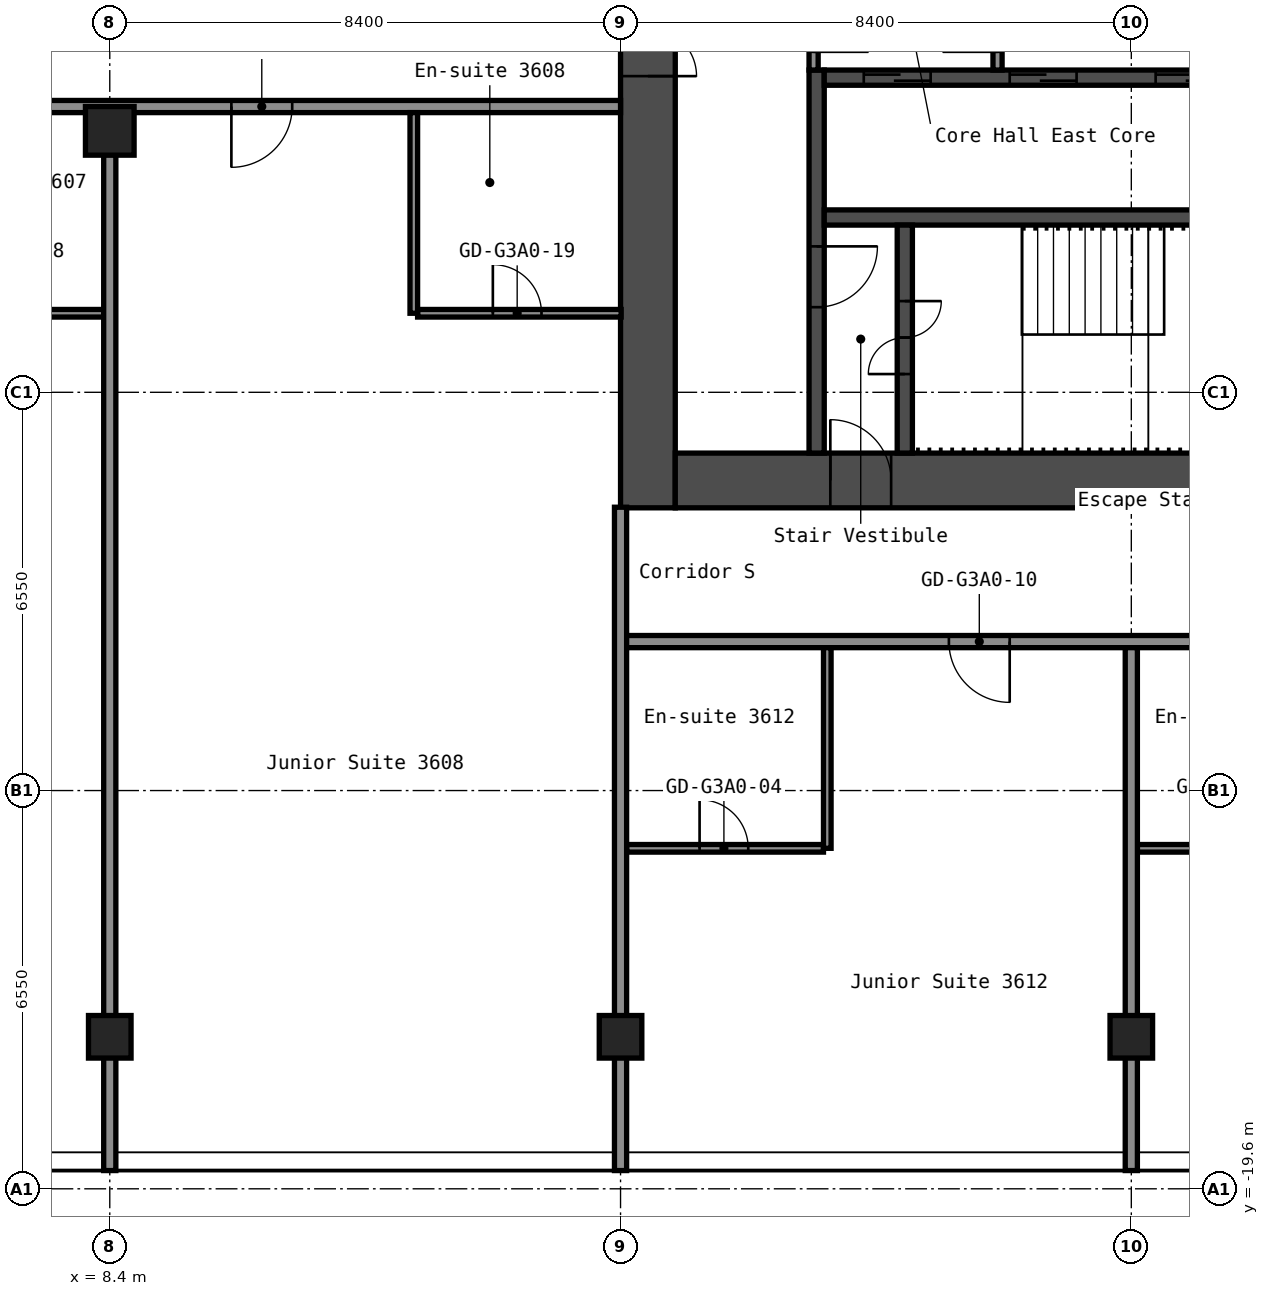
"""IFC4 building model, lengths in metres.
Left out: names, types, materials, properties, quantities, classifications, styles, units other than length and angle.
Written with IfcOpenShell. Run it as: python <this file> out.ifc"""

import sys

from ifc_helpers import new_model, si_unit, direction, frame, frame_2d, origin, origin_2d, place, context, subcontext, project, spatial, rectangle, hollow_rectangle, extrude, element, fill, save


model = new_model("IFC4")
c1 = context("Model", 3, precision=1e-05, world=origin(), true_north=direction((0.0, 1.0)))
c2 = subcontext(c1, "Body", "Model", "MODEL_VIEW")
j1 = project(units=[si_unit("LENGTHUNIT", "METRE"), si_unit("PLANEANGLEUNIT", "RADIAN")], contexts=[c1])
p1 = place(None, origin())
s1 = spatial("IfcSite", under=j1, at=p1, CompositionType="ELEMENT")
p2 = place(p1, origin())
s2 = spatial("IfcBuilding", under=s1, at=p2, CompositionType="ELEMENT")
p3 = place(p2, frame((0.0, 0.0, 131.0)))
s3 = spatial("IfcBuildingStorey", under=s2, at=p3, CompositionType="ELEMENT", Elevation=131.0)
p4 = place(p3, frame((8.4, -17.1, 0.0), z_axis=(0.0, 0.0, 1.0), x_axis=(1.0, 0.0, 0.0)))
e1 = element("IfcColumn", 1, at=p4, inside=s3, PredefinedType="COLUMN", context=c2, shape_type="SweptSolid", body=[
    extrude(hollow_rectangle(XDim=0.7, YDim=0.7, WallThickness=0.028, at=origin_2d()), origin(), (0.0, 0.0, 1.0), 2.75),
])
p5 = place(p3, frame((8.4, -2.2, 0.0), z_axis=(0.0, 0.0, 1.0), x_axis=(1.0, 0.0, 0.0)))
e2 = element("IfcColumn", 2, at=p5, inside=s3, PredefinedType="COLUMN", context=c2, shape_type="SweptSolid", body=[
    extrude(hollow_rectangle(XDim=0.8, YDim=0.8, WallThickness=0.032, at=origin_2d()), origin(), (0.0, 0.0, 1.0), 2.75),
])
for number, where, z_axis, x_axis in (
    (3, (16.8, -17.1, 0.0), (0.0, 0.0, 1.0), (1.0, 0.0, 0.0)),
    (4, (25.2, -17.1, 0.0), (0.0, 0.0, 1.0), (1.0, 0.0, 0.0)),
):
    element("IfcColumn", number, at=place(p3, frame(where, z_axis=z_axis, x_axis=x_axis)), inside=s3, PredefinedType="COLUMN", context=c2, shape_type="SweptSolid", body=[
        extrude(hollow_rectangle(XDim=0.7, YDim=0.7, WallThickness=0.028, at=origin_2d()), origin(), (0.0, 0.0, 1.0), 2.75),
    ])
p6 = place(p3, frame((17.25, -8.4, 0.0), z_axis=(0.0, 0.0, 1.0), x_axis=(0.0, 1.0, 0.0)))
e5 = element("IfcWall", 5, at=p6, inside=s3, PredefinedType="SHEAR", context=c2, shape_type="SweptSolid", body=[
    extrude(rectangle(XDim=16.8, YDim=0.9, at=frame_2d((8.4, 0.0))), origin(), (0.0, 0.0, 1.0), 2.75),
])
p7 = place(p6, frame((7.1, 0.0, 0.0)))
e6 = element("IfcOpeningElement", 6, at=p7, cuts=e5, PredefinedType="OPENING", context=c2, shape_type="SweptSolid", body=[
    extrude(rectangle(XDim=1.6, YDim=2.1, at=frame_2d((0.8, 1.05))), frame((0.0, 0.46, 0.0), z_axis=(0.0, -1.0, 0.0), x_axis=(1.0, 0.0, 0.0)), (0.0, 0.0, 1.0), 0.92),
])
p8 = place(p3, frame((17.7, -7.95, 0.0), z_axis=(0.0, 0.0, 1.0), x_axis=(1.0, 0.0, 0.0)))
e7 = element("IfcWall", 7, at=p8, inside=s3, PredefinedType="SHEAR", context=c2, shape_type="SweptSolid", body=[
    extrude(rectangle(XDim=15.0, YDim=0.9, at=frame_2d((7.5, 0.0))), origin(), (0.0, 0.0, 1.0), 2.75),
])
p9 = place(p8, frame((2.55, 0.0, 0.0)))
e8 = element("IfcOpeningElement", 8, at=p9, cuts=e7, PredefinedType="OPENING", context=c2, shape_type="SweptSolid", body=[
    extrude(rectangle(XDim=1.0, YDim=2.1, at=frame_2d((0.5, 1.05))), frame((0.0, 0.46, 0.0), z_axis=(0.0, -1.0, 0.0), x_axis=(1.0, 0.0, 0.0)), (0.0, 0.0, 1.0), 0.92),
])
p10 = place(p3, frame((20.025, -7.5, 0.0), z_axis=(0.0, 0.0, 1.0), x_axis=(0.0, 1.0, 0.0)))
e9 = element("IfcWall", 9, at=p10, inside=s3, PredefinedType="SHEAR", context=c2, shape_type="SweptSolid", body=[
    extrude(rectangle(XDim=6.3, YDim=0.25, at=frame_2d((3.15, 0.0))), origin(), (0.0, 0.0, 1.0), 2.75),
])
p11 = place(p10, frame((2.4, 0.0, 0.0)))
e10 = element("IfcOpeningElement", 10, at=p11, cuts=e9, PredefinedType="OPENING", context=c2, shape_type="SweptSolid", body=[
    extrude(rectangle(XDim=1.0, YDim=2.1, at=frame_2d((0.5, 1.05))), frame((0.0, 0.135, 0.0), z_axis=(0.0, -1.0, 0.0), x_axis=(1.0, 0.0, 0.0)), (0.0, 0.0, 1.0), 0.27),
])
p12 = place(p3, frame((20.15, -1.325, 0.0), z_axis=(0.0, 0.0, 1.0), x_axis=(1.0, 0.0, 0.0)))
e11 = element("IfcWall", 11, at=p12, inside=s3, PredefinedType="SHEAR", context=c2, shape_type="SweptSolid", body=[
    extrude(rectangle(XDim=7.5, YDim=0.25, at=frame_2d((3.75, 0.0))), origin(), (0.0, 0.0, 1.0), 2.75),
])
p13 = place(p12, frame((0.65, 0.0, 0.0)))
e12 = element("IfcOpeningElement", 12, at=p13, cuts=e11, PredefinedType="OPENING", context=c2, shape_type="SweptSolid", body=[
    extrude(rectangle(XDim=1.1, YDim=2.1, at=frame_2d((0.55, 1.05))), frame((0.0, 0.135, 0.0), z_axis=(0.0, -1.0, 0.0), x_axis=(1.0, 0.0, 0.0)), (0.0, 0.0, 1.0), 0.27),
])
p14 = place(p12, frame((3.05, 0.0, 0.0)))
e13 = element("IfcOpeningElement", 13, at=p14, cuts=e11, PredefinedType="OPENING", context=c2, shape_type="SweptSolid", body=[
    extrude(rectangle(XDim=1.1, YDim=2.1, at=frame_2d((0.55, 1.05))), frame((0.0, 0.135, 0.0), z_axis=(0.0, -1.0, 0.0), x_axis=(1.0, 0.0, 0.0)), (0.0, 0.0, 1.0), 0.27),
])
p15 = place(p12, frame((5.45, 0.0, 0.0)))
e14 = element("IfcOpeningElement", 14, at=p15, cuts=e11, PredefinedType="OPENING", context=c2, shape_type="SweptSolid", body=[
    extrude(rectangle(XDim=1.1, YDim=2.1, at=frame_2d((0.55, 1.05))), frame((0.0, 0.135, 0.0), z_axis=(0.0, -1.0, 0.0), x_axis=(1.0, 0.0, 0.0)), (0.0, 0.0, 1.0), 0.27),
])
p16 = place(p3, frame((20.15, -3.625, 0.0), z_axis=(0.0, 0.0, 1.0), x_axis=(1.0, 0.0, 0.0)))
e15 = element("IfcWall", 15, at=p16, inside=s3, PredefinedType="SHEAR", context=c2, shape_type="SweptSolid", body=[
    extrude(rectangle(XDim=7.5, YDim=0.25, at=frame_2d((3.75, 0.0))), origin(), (0.0, 0.0, 1.0), 2.75),
])
p17 = place(p3, frame((21.475, -7.5, 0.0), z_axis=(0.0, 0.0, 1.0), x_axis=(0.0, 1.0, 0.0)))
e16 = element("IfcWall", 16, at=p17, inside=s3, PredefinedType="SHEAR", context=c2, shape_type="SweptSolid", body=[
    extrude(rectangle(XDim=3.75, YDim=0.25, at=frame_2d((1.875, 0.0))), origin(), (0.0, 0.0, 1.0), 2.75),
])
p18 = place(p17, frame((1.3, 0.0, 0.0)))
e17 = element("IfcOpeningElement", 17, at=p18, cuts=e16, PredefinedType="OPENING", context=c2, shape_type="SweptSolid", body=[
    extrude(rectangle(XDim=1.2, YDim=2.1, at=frame_2d((0.6, 1.05))), frame((0.0, 0.135, 0.0), z_axis=(0.0, -1.0, 0.0), x_axis=(1.0, 0.0, 0.0)), (0.0, 0.0, 1.0), 0.27),
])
p19 = place(p3, frame((19.975, -1.2, 0.0), z_axis=(0.0, 0.0, 1.0), x_axis=(0.0, 1.0, 0.0)))
e18 = element("IfcWall", 18, at=p19, inside=s3, PredefinedType="PARTITIONING", context=c2, shape_type="SweptSolid", body=[
    extrude(rectangle(XDim=2.4, YDim=0.15, at=frame_2d((1.2, 0.0))), origin(), (0.0, 0.0, 1.0), 2.75),
])
p20 = place(p19, frame((0.3, 0.0, 0.0)))
e19 = element("IfcOpeningElement", 19, at=p20, cuts=e18, PredefinedType="OPENING", context=c2, shape_type="SweptSolid", body=[
    extrude(rectangle(XDim=1.8, YDim=2.1, at=frame_2d((0.9, 1.05))), frame((0.0, 0.085, 0.0), z_axis=(0.0, -1.0, 0.0), x_axis=(1.0, 0.0, 0.0)), (0.0, 0.0, 1.0), 0.17),
])
p21 = place(p3, frame((23.0, -1.2, 0.0), z_axis=(0.0, 0.0, 1.0), x_axis=(0.0, 1.0, 0.0)))
e20 = element("IfcWall", 20, at=p21, inside=s3, PredefinedType="PARTITIONING", context=c2, shape_type="SweptSolid", body=[
    extrude(rectangle(XDim=2.4, YDim=0.15, at=frame_2d((1.2, 0.0))), origin(), (0.0, 0.0, 1.0), 2.75),
])
p22 = place(p21, frame((0.3, 0.0, 0.0)))
e21 = element("IfcOpeningElement", 21, at=p22, cuts=e20, PredefinedType="OPENING", context=c2, shape_type="SweptSolid", body=[
    extrude(rectangle(XDim=1.8, YDim=2.1, at=frame_2d((0.9, 1.05))), frame((0.0, 0.085, 0.0), z_axis=(0.0, -1.0, 0.0), x_axis=(1.0, 0.0, 0.0)), (0.0, 0.0, 1.0), 0.17),
])
p23 = place(p3, frame((16.9, -14.0, 0.0), z_axis=(0.0, 0.0, 1.0), x_axis=(1.0, 0.0, 0.0)))
e22 = element("IfcWall", 22, at=p23, inside=s3, PredefinedType="PARTITIONING", context=c2, shape_type="SweptSolid", body=[
    extrude(rectangle(XDim=3.238, YDim=0.125, at=frame_2d((1.619, 0.0))), origin(), (0.0, 0.0, 1.0), 2.75),
])
p24 = place(p23, frame((1.2, 0.0, 0.0)))
e23 = element("IfcOpeningElement", 23, at=p24, cuts=e22, PredefinedType="OPENING", context=c2, shape_type="SweptSolid", body=[
    extrude(rectangle(XDim=0.8, YDim=2.1, at=frame_2d((0.4, 1.05))), frame((0.0, 0.073, 0.0), z_axis=(0.0, -1.0, 0.0), x_axis=(1.0, 0.0, 0.0)), (0.0, 0.0, 1.0), 0.145),
])
p25 = place(p3, frame((25.3, -14.0, 0.0), z_axis=(0.0, 0.0, 1.0), x_axis=(1.0, 0.0, 0.0)))
e24 = element("IfcWall", 24, at=p25, inside=s3, PredefinedType="PARTITIONING", context=c2, shape_type="SweptSolid", body=[
    extrude(rectangle(XDim=3.238, YDim=0.125, at=frame_2d((1.619, 0.0))), origin(), (0.0, 0.0, 1.0), 2.75),
])
p26 = place(p25, frame((1.2, 0.0, 0.0)))
e25 = element("IfcOpeningElement", 25, at=p26, cuts=e24, PredefinedType="OPENING", context=c2, shape_type="SweptSolid", body=[
    extrude(rectangle(XDim=0.8, YDim=2.1, at=frame_2d((0.4, 1.05))), frame((0.0, 0.073, 0.0), z_axis=(0.0, -1.0, 0.0), x_axis=(1.0, 0.0, 0.0)), (0.0, 0.0, 1.0), 0.145),
])
p27 = place(p3, frame((16.8, -10.6, 0.0), z_axis=(0.0, 0.0, 1.0), x_axis=(1.0, 0.0, 0.0)))
e26 = element("IfcWall", 26, at=p27, inside=s3, PredefinedType="PARTITIONING", context=c2, shape_type="SweptSolid", body=[
    extrude(rectangle(XDim=25.9, YDim=0.2, at=frame_2d((12.95, 0.0))), origin(), (0.0, 0.0, 1.0), 2.75),
])
p28 = place(p27, frame((5.4, 0.0, 0.0)))
e27 = element("IfcOpeningElement", 27, at=p28, cuts=e26, PredefinedType="OPENING", context=c2, shape_type="SweptSolid", body=[
    extrude(rectangle(XDim=1.0, YDim=2.1, at=frame_2d((0.5, 1.05))), frame((0.0, 0.11, 0.0), z_axis=(0.0, -1.0, 0.0), x_axis=(1.0, 0.0, 0.0)), (0.0, 0.0, 1.0), 0.22),
])
p29 = place(p27, frame((13.8, 0.0, 0.0)))
e28 = element("IfcOpeningElement", 28, at=p29, cuts=e26, PredefinedType="OPENING", context=c2, shape_type="SweptSolid", body=[
    extrude(rectangle(XDim=1.0, YDim=2.1, at=frame_2d((0.5, 1.05))), frame((0.0, 0.11, 0.0), z_axis=(0.0, -1.0, 0.0), x_axis=(1.0, 0.0, 0.0)), (0.0, 0.0, 1.0), 0.22),
])
p30 = place(p27, frame((22.4, 0.0, 0.0)))
e29 = element("IfcOpeningElement", 29, at=p30, cuts=e26, PredefinedType="OPENING", context=c2, shape_type="SweptSolid", body=[
    extrude(rectangle(XDim=1.0, YDim=2.1, at=frame_2d((0.5, 1.05))), frame((0.0, 0.11, 0.0), z_axis=(0.0, -1.0, 0.0), x_axis=(1.0, 0.0, 0.0)), (0.0, 0.0, 1.0), 0.22),
])
p31 = place(p3, frame((5.062, -5.2, 0.0), z_axis=(0.0, 0.0, 1.0), x_axis=(1.0, 0.0, 0.0)))
e30 = element("IfcWall", 30, at=p31, inside=s3, PredefinedType="PARTITIONING", context=c2, shape_type="SweptSolid", body=[
    extrude(rectangle(XDim=3.238, YDim=0.125, at=frame_2d((1.619, 0.0))), origin(), (0.0, 0.0, 1.0), 2.75),
])
p32 = place(p31, frame((1.238, 0.0, 0.0)))
e31 = element("IfcOpeningElement", 31, at=p32, cuts=e30, PredefinedType="OPENING", context=c2, shape_type="SweptSolid", body=[
    extrude(rectangle(XDim=0.8, YDim=2.1, at=frame_2d((0.4, 1.05))), frame((0.0, 0.073, 0.0), z_axis=(0.0, -1.0, 0.0), x_axis=(1.0, 0.0, 0.0)), (0.0, 0.0, 1.0), 0.145),
])
p33 = place(p3, frame((13.462, -5.2, 0.0), z_axis=(0.0, 0.0, 1.0), x_axis=(1.0, 0.0, 0.0)))
e32 = element("IfcWall", 32, at=p33, inside=s3, PredefinedType="PARTITIONING", context=c2, shape_type="SweptSolid", body=[
    extrude(rectangle(XDim=3.348, YDim=0.125, at=frame_2d((1.674, 0.0))), origin(), (0.0, 0.0, 1.0), 2.75),
])
p34 = place(p33, frame((1.238, 0.0, 0.0)))
e33 = element("IfcOpeningElement", 33, at=p34, cuts=e32, PredefinedType="OPENING", context=c2, shape_type="SweptSolid", body=[
    extrude(rectangle(XDim=0.8, YDim=2.1, at=frame_2d((0.4, 1.05))), frame((0.0, 0.073, 0.0), z_axis=(0.0, -1.0, 0.0), x_axis=(1.0, 0.0, 0.0)), (0.0, 0.0, 1.0), 0.145),
])
p35 = place(p3, frame((-16.8, -1.8, 0.0), z_axis=(0.0, 0.0, 1.0), x_axis=(1.0, 0.0, 0.0)))
e34 = element("IfcWall", 34, at=p35, inside=s3, PredefinedType="PARTITIONING", context=c2, shape_type="SweptSolid", body=[
    extrude(rectangle(XDim=33.6, YDim=0.2, at=frame_2d((16.8, 0.0))), origin(), (0.0, 0.0, 1.0), 2.75),
])
p36 = place(p35, frame((2.0, 0.0, 0.0)))
e35 = element("IfcOpeningElement", 35, at=p36, cuts=e34, PredefinedType="OPENING", context=c2, shape_type="SweptSolid", body=[
    extrude(rectangle(XDim=1.0, YDim=2.1, at=frame_2d((0.5, 1.05))), frame((0.0, 0.11, 0.0), z_axis=(0.0, -1.0, 0.0), x_axis=(1.0, 0.0, 0.0)), (0.0, 0.0, 1.0), 0.22),
])
p37 = place(p35, frame((10.47, 0.0, 0.0)))
e36 = element("IfcOpeningElement", 36, at=p37, cuts=e34, PredefinedType="OPENING", context=c2, shape_type="SweptSolid", body=[
    extrude(rectangle(XDim=0.9, YDim=2.1, at=frame_2d((0.45, 1.05))), frame((0.0, 0.11, 0.0), z_axis=(0.0, -1.0, 0.0), x_axis=(1.0, 0.0, 0.0)), (0.0, 0.0, 1.0), 0.22),
])
p38 = place(p35, frame((14.67, 0.0, 0.0)))
e37 = element("IfcOpeningElement", 37, at=p38, cuts=e34, PredefinedType="OPENING", context=c2, shape_type="SweptSolid", body=[
    extrude(rectangle(XDim=0.9, YDim=2.1, at=frame_2d((0.45, 1.05))), frame((0.0, 0.11, 0.0), z_axis=(0.0, -1.0, 0.0), x_axis=(1.0, 0.0, 0.0)), (0.0, 0.0, 1.0), 0.22),
])
p39 = place(p35, frame((18.8, 0.0, 0.0)))
e38 = element("IfcOpeningElement", 38, at=p39, cuts=e34, PredefinedType="OPENING", context=c2, shape_type="SweptSolid", body=[
    extrude(rectangle(XDim=1.0, YDim=2.1, at=frame_2d((0.5, 1.05))), frame((0.0, 0.11, 0.0), z_axis=(0.0, -1.0, 0.0), x_axis=(1.0, 0.0, 0.0)), (0.0, 0.0, 1.0), 0.22),
])
p40 = place(p35, frame((27.2, 0.0, 0.0)))
e39 = element("IfcOpeningElement", 39, at=p40, cuts=e34, PredefinedType="OPENING", context=c2, shape_type="SweptSolid", body=[
    extrude(rectangle(XDim=1.0, YDim=2.1, at=frame_2d((0.5, 1.05))), frame((0.0, 0.11, 0.0), z_axis=(0.0, -1.0, 0.0), x_axis=(1.0, 0.0, 0.0)), (0.0, 0.0, 1.0), 0.22),
])
p41 = place(p3, frame((8.4, -19.3, 0.0), z_axis=(0.0, 0.0, 1.0), x_axis=(0.0, 1.0, 0.0)))
e40 = element("IfcWall", 40, at=p41, inside=s3, PredefinedType="PARTITIONING", context=c2, shape_type="SweptSolid", body=[
    extrude(rectangle(XDim=16.71, YDim=0.2, at=frame_2d((8.355, 0.0))), origin(), (0.0, 0.0, 1.0), 2.75),
])
p42 = place(p3, frame((13.4, -5.2, 0.0), z_axis=(0.0, 0.0, 1.0), x_axis=(0.0, 1.0, 0.0)))
e41 = element("IfcWall", 41, at=p42, inside=s3, PredefinedType="PARTITIONING", context=c2, shape_type="SweptSolid", body=[
    extrude(rectangle(XDim=3.3, YDim=0.125, at=frame_2d((1.65, 0.0))), origin(), (0.0, 0.0, 1.0), 2.75),
])
p43 = place(p3, frame((16.8, -19.3, 0.0), z_axis=(0.0, 0.0, 1.0), x_axis=(0.0, 1.0, 0.0)))
e42 = element("IfcWall", 42, at=p43, inside=s3, PredefinedType="PARTITIONING", context=c2, shape_type="SweptSolid", body=[
    extrude(rectangle(XDim=10.91, YDim=0.2, at=frame_2d((5.455, 0.0))), origin(), (0.0, 0.0, 1.0), 2.75),
])
p44 = place(p3, frame((20.2, -14.0, 0.0), z_axis=(0.0, 0.0, 1.0), x_axis=(0.0, 1.0, 0.0)))
e43 = element("IfcWall", 43, at=p44, inside=s3, PredefinedType="PARTITIONING", context=c2, shape_type="SweptSolid", body=[
    extrude(rectangle(XDim=3.3, YDim=0.125, at=frame_2d((1.65, 0.0))), origin(), (0.0, 0.0, 1.0), 2.75),
])
p45 = place(p3, frame((25.2, -19.3, 0.0), z_axis=(0.0, 0.0, 1.0), x_axis=(0.0, 1.0, 0.0)))
e44 = element("IfcWall", 44, at=p45, inside=s3, PredefinedType="PARTITIONING", context=c2, shape_type="SweptSolid", body=[
    extrude(rectangle(XDim=8.6, YDim=0.2, at=frame_2d((4.3, 0.0))), origin(), (0.0, 0.0, 1.0), 2.75),
])
p46 = place(p7, origin())
e45 = element("IfcDoor", 45, at=p46, inside=s3, OperationType="DOUBLE_DOOR_SINGLE_SWING", PredefinedType="DOOR", context=c2, shape_type="SweptSolid", body=[
    extrude(rectangle(XDim=1.6, YDim=2.1, at=frame_2d((0.8, 1.05))), frame((0.0, 0.025, 0.0), z_axis=(0.0, -1.0, 0.0), x_axis=(1.0, 0.0, 0.0)), (0.0, 0.0, 1.0), 0.05),
])
fill(e6, e45)
p47 = place(p9, origin())
e46 = element("IfcDoor", 46, at=p47, inside=s3, OperationType="SINGLE_SWING_RIGHT", PredefinedType="DOOR", context=c2, shape_type="SweptSolid", body=[
    extrude(rectangle(XDim=1.0, YDim=2.1, at=frame_2d((0.5, 1.05))), frame((0.0, 0.025, 0.0), z_axis=(0.0, -1.0, 0.0), x_axis=(1.0, 0.0, 0.0)), (0.0, 0.0, 1.0), 0.05),
])
fill(e8, e46)
p48 = place(p18, origin())
e47 = element("IfcDoor", 47, at=p48, inside=s3, OperationType="DOUBLE_DOOR_SINGLE_SWING", PredefinedType="DOOR", context=c2, shape_type="SweptSolid", body=[
    extrude(rectangle(XDim=1.2, YDim=2.1, at=frame_2d((0.6, 1.05))), frame((0.0, 0.025, 0.0), z_axis=(0.0, -1.0, 0.0), x_axis=(1.0, 0.0, 0.0)), (0.0, 0.0, 1.0), 0.05),
])
fill(e17, e47)
p49 = place(p11, origin())
e48 = element("IfcDoor", 48, at=p49, inside=s3, OperationType="SINGLE_SWING_RIGHT", PredefinedType="DOOR", context=c2, shape_type="SweptSolid", body=[
    extrude(rectangle(XDim=1.0, YDim=2.1, at=frame_2d((0.5, 1.05))), frame((0.0, 0.025, 0.0), z_axis=(0.0, -1.0, 0.0), x_axis=(1.0, 0.0, 0.0)), (0.0, 0.0, 1.0), 0.05),
])
fill(e10, e48)
p50 = place(p20, origin())
e49 = element("IfcDoor", 49, at=p50, inside=s3, OperationType="DOUBLE_DOOR_SINGLE_SWING", PredefinedType="DOOR", context=c2, shape_type="SweptSolid", body=[
    extrude(rectangle(XDim=1.8, YDim=2.1, at=frame_2d((0.9, 1.05))), frame((0.0, 0.025, 0.0), z_axis=(0.0, -1.0, 0.0), x_axis=(1.0, 0.0, 0.0)), (0.0, 0.0, 1.0), 0.05),
])
fill(e19, e49)
p51 = place(p22, origin())
e50 = element("IfcDoor", 50, at=p51, inside=s3, OperationType="DOUBLE_DOOR_SINGLE_SWING", PredefinedType="DOOR", context=c2, shape_type="SweptSolid", body=[
    extrude(rectangle(XDim=1.8, YDim=2.1, at=frame_2d((0.9, 1.05))), frame((0.0, 0.025, 0.0), z_axis=(0.0, -1.0, 0.0), x_axis=(1.0, 0.0, 0.0)), (0.0, 0.0, 1.0), 0.05),
])
fill(e21, e50)
p52 = place(p13, origin())
e51 = element("IfcDoor", 51, at=p52, inside=s3, OperationType="DOUBLE_DOOR_SLIDING", PredefinedType="DOOR", context=c2, shape_type="SweptSolid", body=[
    extrude(rectangle(XDim=1.1, YDim=2.1, at=frame_2d((0.55, 1.05))), frame((0.0, 0.025, 0.0), z_axis=(0.0, -1.0, 0.0), x_axis=(1.0, 0.0, 0.0)), (0.0, 0.0, 1.0), 0.05),
])
fill(e12, e51)
p53 = place(p14, origin())
e52 = element("IfcDoor", 52, at=p53, inside=s3, OperationType="DOUBLE_DOOR_SLIDING", PredefinedType="DOOR", context=c2, shape_type="SweptSolid", body=[
    extrude(rectangle(XDim=1.1, YDim=2.1, at=frame_2d((0.55, 1.05))), frame((0.0, 0.025, 0.0), z_axis=(0.0, -1.0, 0.0), x_axis=(1.0, 0.0, 0.0)), (0.0, 0.0, 1.0), 0.05),
])
fill(e13, e52)
p54 = place(p15, origin())
e53 = element("IfcDoor", 53, at=p54, inside=s3, OperationType="DOUBLE_DOOR_SLIDING", PredefinedType="DOOR", context=c2, shape_type="SweptSolid", body=[
    extrude(rectangle(XDim=1.1, YDim=2.1, at=frame_2d((0.55, 1.05))), frame((0.0, 0.025, 0.0), z_axis=(0.0, -1.0, 0.0), x_axis=(1.0, 0.0, 0.0)), (0.0, 0.0, 1.0), 0.05),
])
fill(e14, e53)
p55 = place(p24, origin())
e54 = element("IfcDoor", 54, at=p55, inside=s3, OperationType="SINGLE_SWING_RIGHT", PredefinedType="DOOR", context=c2, shape_type="SweptSolid", body=[
    extrude(rectangle(XDim=0.8, YDim=2.1, at=frame_2d((0.4, 1.05))), frame((0.0, 0.025, 0.0), z_axis=(0.0, -1.0, 0.0), x_axis=(1.0, 0.0, 0.0)), (0.0, 0.0, 1.0), 0.05),
])
fill(e23, e54)
p56 = place(p28, origin())
e55 = element("IfcDoor", 55, at=p56, inside=s3, OperationType="SINGLE_SWING_RIGHT", PredefinedType="DOOR", context=c2, shape_type="SweptSolid", body=[
    extrude(rectangle(XDim=1.0, YDim=2.1, at=frame_2d((0.5, 1.05))), frame((0.0, 0.025, 0.0), z_axis=(0.0, -1.0, 0.0), x_axis=(1.0, 0.0, 0.0)), (0.0, 0.0, 1.0), 0.05),
])
fill(e27, e55)
p57 = place(p34, origin())
e56 = element("IfcDoor", 56, at=p57, inside=s3, OperationType="SINGLE_SWING_RIGHT", PredefinedType="DOOR", context=c2, shape_type="SweptSolid", body=[
    extrude(rectangle(XDim=0.8, YDim=2.1, at=frame_2d((0.4, 1.05))), frame((0.0, 0.025, 0.0), z_axis=(0.0, -1.0, 0.0), x_axis=(1.0, 0.0, 0.0)), (0.0, 0.0, 1.0), 0.05),
])
fill(e33, e56)
p58 = place(p40, origin())
e57 = element("IfcDoor", 57, at=p58, inside=s3, OperationType="SINGLE_SWING_LEFT", PredefinedType="DOOR", context=c2, shape_type="SweptSolid", body=[
    extrude(rectangle(XDim=1.0, YDim=2.1, at=frame_2d((0.5, 1.05))), frame((0.0, 0.025, 0.0), z_axis=(0.0, -1.0, 0.0), x_axis=(1.0, 0.0, 0.0)), (0.0, 0.0, 1.0), 0.05),
])
fill(e39, e57)
save(model, sys.argv[1])
